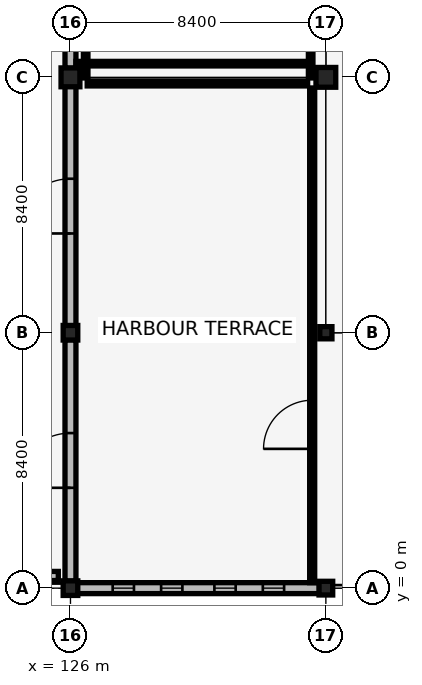
"""IFC4 building model, lengths in metres.
Left out: names, types, materials, properties, quantities, classifications, styles, units other than length and angle.
Written with IfcOpenShell. Run it as: python <this file> out.ifc"""

import sys

from ifc_helpers import new_model, si_unit, direction, frame, frame_2d, origin, origin_2d, place, context, subcontext, project, spatial, rectangle, extrude, element, fill, save


model = new_model("IFC4")
c1 = context("Model", 3, precision=1e-05, world=origin(), true_north=direction((0.0, 1.0)))
c2 = subcontext(c1, "Body", "Model", "MODEL_VIEW")
j1 = project(units=[si_unit("LENGTHUNIT", "METRE"), si_unit("PLANEANGLEUNIT", "RADIAN")], contexts=[c1])
p1 = place(None, origin())
s1 = spatial("IfcSite", under=j1, at=p1, CompositionType="ELEMENT")
p2 = place(p1, origin())
s2 = spatial("IfcBuilding", under=s1, at=p2, CompositionType="ELEMENT")
p3 = place(p2, frame((0.0, 0.0, 13.94)))
s3 = spatial("IfcBuildingStorey", under=s2, at=p3, CompositionType="ELEMENT", Elevation=13.94)
for number, where, z_axis, x_axis in (
    (1, (126.0, 0.0, 0.0), (0.0, 0.0, 1.0), (1.0, 0.0, 0.0)),
    (2, (126.0, 8.4, 0.0), (0.0, 0.0, 1.0), (1.0, 0.0, 0.0)),
):
    element("IfcColumn", number, at=place(p3, frame(where, z_axis=z_axis, x_axis=x_axis)), inside=s3, PredefinedType="COLUMN", context=c2, shape_type="SweptSolid", body=[
        extrude(rectangle(XDim=0.48, YDim=0.48, at=origin_2d()), origin(), (0.0, 0.0, 1.0), 3.78),
    ])
p4 = place(p3, frame((126.0, 16.8, 0.0), z_axis=(0.0, 0.0, 1.0), x_axis=(1.0, 0.0, 0.0)))
e3 = element("IfcColumn", 3, at=p4, inside=s3, PredefinedType="COLUMN", context=c2, shape_type="SweptSolid", body=[
    extrude(rectangle(XDim=0.62, YDim=0.62, at=origin_2d()), origin(), (0.0, 0.0, 1.0), 3.78),
])
p5 = place(p3, frame((134.4, 0.0, 0.0), z_axis=(0.0, 0.0, 1.0), x_axis=(1.0, 0.0, 0.0)))
e4 = element("IfcColumn", 4, at=p5, inside=s3, PredefinedType="COLUMN", context=c2, shape_type="SweptSolid", body=[
    extrude(rectangle(XDim=0.45, YDim=0.45, at=origin_2d()), origin(), (0.0, 0.0, 1.0), 3.78),
])
p6 = place(p3, frame((134.4, 8.4, 0.0), z_axis=(0.0, 0.0, 1.0), x_axis=(1.0, 0.0, 0.0)))
e5 = element("IfcColumn", 5, at=p6, inside=s3, PredefinedType="COLUMN", context=c2, shape_type="SweptSolid", body=[
    extrude(rectangle(XDim=0.4, YDim=0.4, at=origin_2d()), origin(), (0.0, 0.0, 1.0), 3.78),
])
p7 = place(p3, frame((134.4, 16.8, 0.0), z_axis=(0.0, 0.0, 1.0), x_axis=(1.0, 0.0, 0.0)))
e6 = element("IfcColumn", 6, at=p7, inside=s3, PredefinedType="COLUMN", context=c2, shape_type="SweptSolid", body=[
    extrude(rectangle(XDim=0.65, YDim=0.65, at=origin_2d()), origin(), (0.0, 0.0, 1.0), 3.78),
])
p8 = place(p3, frame((126.225, 0.0, 0.0), z_axis=(0.0, 0.0, 1.0), x_axis=(1.0, 0.0, 0.0)))
e7 = element("IfcWall", 7, at=p8, inside=s3, PredefinedType="SOLIDWALL", context=c2, shape_type="SweptSolid", body=[
    extrude(rectangle(XDim=7.965, YDim=0.36, at=frame_2d((3.982, 0.0))), origin(), (0.0, 0.0, 1.0), 3.78),
])
p9 = place(p8, frame((1.163, 0.0, 0.75)))
e8 = element("IfcOpeningElement", 8, at=p9, cuts=e7, PredefinedType="OPENING", context=c2, shape_type="SweptSolid", body=[
    extrude(rectangle(XDim=0.7, YDim=1.95, at=frame_2d((0.35, 0.975))), frame((0.0, 0.19, 0.0), z_axis=(0.0, -1.0, 0.0), x_axis=(1.0, 0.0, 0.0)), (0.0, 0.0, 1.0), 0.38),
])
p10 = place(p8, frame((2.756, 0.0, 0.75)))
e9 = element("IfcOpeningElement", 9, at=p10, cuts=e7, PredefinedType="OPENING", context=c2, shape_type="SweptSolid", body=[
    extrude(rectangle(XDim=0.7, YDim=1.95, at=frame_2d((0.35, 0.975))), frame((0.0, 0.19, 0.0), z_axis=(0.0, -1.0, 0.0), x_axis=(1.0, 0.0, 0.0)), (0.0, 0.0, 1.0), 0.38),
])
p11 = place(p8, frame((4.509, 0.0, 0.75)))
e10 = element("IfcOpeningElement", 10, at=p11, cuts=e7, PredefinedType="OPENING", context=c2, shape_type="SweptSolid", body=[
    extrude(rectangle(XDim=0.7, YDim=1.95, at=frame_2d((0.35, 0.975))), frame((0.0, 0.19, 0.0), z_axis=(0.0, -1.0, 0.0), x_axis=(1.0, 0.0, 0.0)), (0.0, 0.0, 1.0), 0.38),
])
p12 = place(p8, frame((6.102, 0.0, 0.75)))
e11 = element("IfcOpeningElement", 11, at=p12, cuts=e7, PredefinedType="OPENING", context=c2, shape_type="SweptSolid", body=[
    extrude(rectangle(XDim=0.7, YDim=1.95, at=frame_2d((0.35, 0.975))), frame((0.0, 0.19, 0.0), z_axis=(0.0, -1.0, 0.0), x_axis=(1.0, 0.0, 0.0)), (0.0, 0.0, 1.0), 0.38),
])
p13 = place(p3, frame((126.0, 0.225, 0.0), z_axis=(0.0, 0.0, 1.0), x_axis=(0.0, 1.0, 0.0)))
e12 = element("IfcWall", 12, at=p13, inside=s3, PredefinedType="SOLIDWALL", context=c2, shape_type="SweptSolid", body=[
    extrude(rectangle(XDim=7.95, YDim=0.36, at=frame_2d((3.975, 0.0))), origin(), (0.0, 0.0, 1.0), 3.78),
])
p14 = place(p13, frame((3.075, 0.0, 0.0)))
e13 = element("IfcOpeningElement", 13, at=p14, cuts=e12, PredefinedType="OPENING", context=c2, shape_type="SweptSolid", body=[
    extrude(rectangle(XDim=1.8, YDim=2.2, at=frame_2d((0.9, 1.1))), frame((0.0, 0.19, 0.0), z_axis=(0.0, -1.0, 0.0), x_axis=(1.0, 0.0, 0.0)), (0.0, 0.0, 1.0), 0.38),
])
p15 = place(p3, frame((126.0, 8.625, 0.0), z_axis=(0.0, 0.0, 1.0), x_axis=(0.0, 1.0, 0.0)))
e14 = element("IfcWall", 14, at=p15, inside=s3, PredefinedType="SOLIDWALL", context=c2, shape_type="SweptSolid", body=[
    extrude(rectangle(XDim=7.88, YDim=0.36, at=frame_2d((3.94, 0.0))), origin(), (0.0, 0.0, 1.0), 3.78),
])
p16 = place(p15, frame((3.04, 0.0, 0.0)))
e15 = element("IfcOpeningElement", 15, at=p16, cuts=e14, PredefinedType="OPENING", context=c2, shape_type="SweptSolid", body=[
    extrude(rectangle(XDim=1.8, YDim=2.2, at=frame_2d((0.9, 1.1))), frame((0.0, 0.19, 0.0), z_axis=(0.0, -1.0, 0.0), x_axis=(1.0, 0.0, 0.0)), (0.0, 0.0, 1.0), 0.38),
])
p17 = place(p3, frame((126.0, 17.095, 0.0), z_axis=(0.0, 0.0, 1.0), x_axis=(0.0, 1.0, 0.0)))
e16 = element("IfcWall", 16, at=p17, inside=s3, PredefinedType="SOLIDWALL", context=c2, shape_type="SweptSolid", body=[
    extrude(rectangle(XDim=7.795, YDim=0.36, at=frame_2d((3.897, 0.0))), origin(), (0.0, 0.0, 1.0), 3.15),
])
p18 = place(p17, frame((1.106, 0.0, 0.7)))
e17 = element("IfcOpeningElement", 17, at=p18, cuts=e16, PredefinedType="OPENING", context=c2, shape_type="SweptSolid", body=[
    extrude(rectangle(XDim=0.75, YDim=2.1, at=frame_2d((0.375, 1.05))), frame((0.0, 0.19, 0.0), z_axis=(0.0, -1.0, 0.0), x_axis=(1.0, 0.0, 0.0)), (0.0, 0.0, 1.0), 0.38),
])
p19 = place(p17, frame((2.665, 0.0, 0.7)))
e18 = element("IfcOpeningElement", 18, at=p19, cuts=e16, PredefinedType="OPENING", context=c2, shape_type="SweptSolid", body=[
    extrude(rectangle(XDim=0.75, YDim=2.1, at=frame_2d((0.375, 1.05))), frame((0.0, 0.19, 0.0), z_axis=(0.0, -1.0, 0.0), x_axis=(1.0, 0.0, 0.0)), (0.0, 0.0, 1.0), 0.38),
])
p20 = place(p17, frame((4.38, 0.0, 0.7)))
e19 = element("IfcOpeningElement", 19, at=p20, cuts=e16, PredefinedType="OPENING", context=c2, shape_type="SweptSolid", body=[
    extrude(rectangle(XDim=0.75, YDim=2.1, at=frame_2d((0.375, 1.05))), frame((0.0, 0.19, 0.0), z_axis=(0.0, -1.0, 0.0), x_axis=(1.0, 0.0, 0.0)), (0.0, 0.0, 1.0), 0.38),
])
p21 = place(p17, frame((5.939, 0.0, 0.7)))
e20 = element("IfcOpeningElement", 20, at=p21, cuts=e16, PredefinedType="OPENING", context=c2, shape_type="SweptSolid", body=[
    extrude(rectangle(XDim=0.75, YDim=2.1, at=frame_2d((0.375, 1.05))), frame((0.0, 0.19, 0.0), z_axis=(0.0, -1.0, 0.0), x_axis=(1.0, 0.0, 0.0)), (0.0, 0.0, 1.0), 0.38),
])
p22 = place(p3, frame((101.6, 0.4, 0.0), z_axis=(0.0, 0.0, 1.0), x_axis=(1.0, 0.0, 0.0)))
e21 = element("IfcWall", 21, at=p22, inside=s3, PredefinedType="PARAPET", context=c2, shape_type="SweptSolid", body=[
    extrude(rectangle(XDim=24.0, YDim=0.3, at=frame_2d((12.0, 0.0))), origin(), (0.0, 0.0, 1.0), 0.45),
])
p23 = place(p3, frame((133.95, 0.18, 0.0), z_axis=(0.0, 0.0, 1.0), x_axis=(0.0, 1.0, 0.0)))
e22 = element("IfcWall", 22, at=p23, inside=s3, PredefinedType="PARTITIONING", context=c2, shape_type="SweptSolid", body=[
    extrude(rectangle(XDim=16.27, YDim=0.165, at=frame_2d((8.135, 0.0))), origin(), (0.0, 0.0, 1.0), 3.78),
])
p24 = place(p23, frame((4.401, 0.0, 0.0)))
e23 = element("IfcOpeningElement", 23, at=p24, cuts=e22, PredefinedType="OPENING", context=c2, shape_type="SweptSolid", body=[
    extrude(rectangle(XDim=1.6, YDim=2.25, at=frame_2d((0.8, 1.125))), frame((0.0, 0.093, 0.0), z_axis=(0.0, -1.0, 0.0), x_axis=(1.0, 0.0, 0.0)), (0.0, 0.0, 1.0), 0.185),
])
p25 = place(p3, frame((126.55, 16.6, 0.0), z_axis=(0.0, 0.0, 1.0), x_axis=(1.0, 0.0, 0.0)))
e24 = element("IfcWall", 24, at=p25, inside=s3, PredefinedType="PARTITIONING", context=c2, shape_type="SweptSolid", body=[
    extrude(rectangle(XDim=7.25, YDim=0.165, at=frame_2d((3.625, 0.0))), origin(), (0.0, 0.0, 1.0), 3.15),
])
p26 = place(p3, frame((133.9, 16.78, 0.0), z_axis=(0.0, 0.0, 1.0), x_axis=(0.0, 1.0, 0.0)))
e25 = element("IfcWall", 25, at=p26, inside=s3, PredefinedType="PARTITIONING", context=c2, shape_type="SweptSolid", body=[
    extrude(rectangle(XDim=8.39, YDim=0.15, at=frame_2d((4.195, 0.0))), origin(), (0.0, 0.0, 1.0), 3.13),
])
p27 = place(p26, frame((3.67, 0.0, 0.0)))
e26 = element("IfcOpeningElement", 26, at=p27, cuts=e25, PredefinedType="OPENING", context=c2, shape_type="SweptSolid", body=[
    extrude(rectangle(XDim=1.05, YDim=2.15, at=frame_2d((0.525, 1.075))), frame((0.0, 0.085, 0.0), z_axis=(0.0, -1.0, 0.0), x_axis=(1.0, 0.0, 0.0)), (0.0, 0.0, 1.0), 0.17),
])
p28 = place(p3, frame((126.18, 17.25, 0.0), z_axis=(0.0, 0.0, 1.0), x_axis=(1.0, 0.0, 0.0)))
e27 = element("IfcWall", 27, at=p28, inside=s3, PredefinedType="PARTITIONING", context=c2, shape_type="SweptSolid", body=[
    extrude(rectangle(XDim=7.57, YDim=0.15, at=frame_2d((3.785, 0.0))), origin(), (0.0, 0.0, 1.0), 3.15),
])
p29 = place(p3, frame((126.5, 16.78, 0.0), z_axis=(0.0, 0.0, 1.0), x_axis=(0.0, 1.0, 0.0)))
e28 = element("IfcWall", 28, at=p29, inside=s3, PredefinedType="PARTITIONING", context=c2, shape_type="SweptSolid", body=[
    extrude(rectangle(XDim=8.39, YDim=0.15, at=frame_2d((4.195, 0.0))), origin(), (0.0, 0.0, 1.0), 3.13),
])
p30 = place(p9, origin())
e29 = element("IfcWindow", 29, at=p30, inside=s3, PartitioningType="DOUBLE_PANEL_VERTICAL", PredefinedType="WINDOW", context=c2, shape_type="SweptSolid", body=[
    extrude(rectangle(XDim=0.7, YDim=1.95, at=frame_2d((0.35, 0.975))), frame((0.0, 0.03, 0.0), z_axis=(0.0, -1.0, 0.0), x_axis=(1.0, 0.0, 0.0)), (0.0, 0.0, 1.0), 0.06),
])
fill(e8, e29)
p31 = place(p10, origin())
e30 = element("IfcWindow", 30, at=p31, inside=s3, PartitioningType="DOUBLE_PANEL_VERTICAL", PredefinedType="WINDOW", context=c2, shape_type="SweptSolid", body=[
    extrude(rectangle(XDim=0.7, YDim=1.95, at=frame_2d((0.35, 0.975))), frame((0.0, 0.03, 0.0), z_axis=(0.0, -1.0, 0.0), x_axis=(1.0, 0.0, 0.0)), (0.0, 0.0, 1.0), 0.06),
])
fill(e9, e30)
p32 = place(p11, origin())
e31 = element("IfcWindow", 31, at=p32, inside=s3, PartitioningType="DOUBLE_PANEL_VERTICAL", PredefinedType="WINDOW", context=c2, shape_type="SweptSolid", body=[
    extrude(rectangle(XDim=0.7, YDim=1.95, at=frame_2d((0.35, 0.975))), frame((0.0, 0.03, 0.0), z_axis=(0.0, -1.0, 0.0), x_axis=(1.0, 0.0, 0.0)), (0.0, 0.0, 1.0), 0.06),
])
fill(e10, e31)
p33 = place(p12, origin())
e32 = element("IfcWindow", 32, at=p33, inside=s3, PartitioningType="DOUBLE_PANEL_VERTICAL", PredefinedType="WINDOW", context=c2, shape_type="SweptSolid", body=[
    extrude(rectangle(XDim=0.7, YDim=1.95, at=frame_2d((0.35, 0.975))), frame((0.0, 0.03, 0.0), z_axis=(0.0, -1.0, 0.0), x_axis=(1.0, 0.0, 0.0)), (0.0, 0.0, 1.0), 0.06),
])
fill(e11, e32)
p34 = place(p14, origin())
e33 = element("IfcDoor", 33, at=p34, inside=s3, OperationType="DOUBLE_DOOR_SINGLE_SWING", PredefinedType="DOOR", context=c2, shape_type="SweptSolid", body=[
    extrude(rectangle(XDim=1.8, YDim=2.2, at=frame_2d((0.9, 1.1))), frame((0.0, 0.025, 0.0), z_axis=(0.0, -1.0, 0.0), x_axis=(1.0, 0.0, 0.0)), (0.0, 0.0, 1.0), 0.05),
])
fill(e13, e33)
p35 = place(p16, origin())
e34 = element("IfcDoor", 34, at=p35, inside=s3, OperationType="DOUBLE_DOOR_SINGLE_SWING", PredefinedType="DOOR", context=c2, shape_type="SweptSolid", body=[
    extrude(rectangle(XDim=1.8, YDim=2.2, at=frame_2d((0.9, 1.1))), frame((0.0, 0.025, 0.0), z_axis=(0.0, -1.0, 0.0), x_axis=(1.0, 0.0, 0.0)), (0.0, 0.0, 1.0), 0.05),
])
fill(e15, e34)
p36 = place(p24, origin())
e35 = element("IfcDoor", 35, at=p36, inside=s3, OperationType="DOUBLE_DOOR_SINGLE_SWING", PredefinedType="DOOR", context=c2, shape_type="SweptSolid", body=[
    extrude(rectangle(XDim=1.6, YDim=2.25, at=frame_2d((0.8, 1.125))), frame((0.0, 0.025, 0.0), z_axis=(0.0, -1.0, 0.0), x_axis=(1.0, 0.0, 0.0)), (0.0, 0.0, 1.0), 0.05),
])
fill(e23, e35)
save(model, sys.argv[1])
